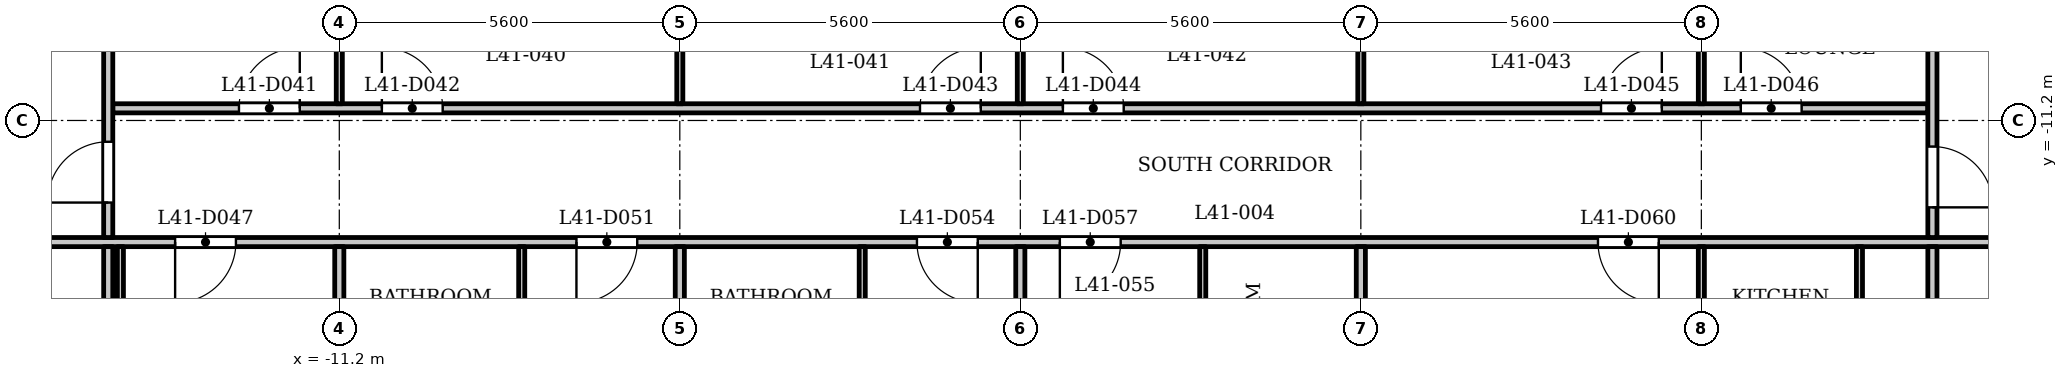
"""IFC4 building model, lengths in metres.
Left out: names, types, materials, properties, quantities, classifications, styles, units other than length and angle.
Written with IfcOpenShell. Run it as: python <this file> out.ifc"""

import sys

from ifc_helpers import new_model, si_unit, direction, frame, frame_2d, origin, place, context, subcontext, project, spatial, rectangle, extrude, element, fill, save


model = new_model("IFC4")
c1 = context("Model", 3, precision=1e-05, world=origin(), true_north=direction((0.0, 1.0)))
c2 = subcontext(c1, "Body", "Model", "MODEL_VIEW")
j1 = project(units=[si_unit("LENGTHUNIT", "METRE"), si_unit("PLANEANGLEUNIT", "RADIAN")], contexts=[c1])
p1 = place(None, origin())
s1 = spatial("IfcSite", under=j1, at=p1, CompositionType="ELEMENT")
p2 = place(p1, origin())
s2 = spatial("IfcBuilding", under=s1, at=p2, CompositionType="ELEMENT")
p3 = place(p2, frame((0.0, 0.0, 160.6)))
s3 = spatial("IfcBuildingStorey", under=s2, at=p3, CompositionType="ELEMENT", Elevation=160.6)
p4 = place(p3, frame((-17.4, -13.2, 0.0), z_axis=(0.0, 0.0, 1.0), x_axis=(1.0, 0.0, 0.0)))
e1 = element("IfcWall", 1, at=p4, inside=s3, PredefinedType="PARTITIONING", context=c2, shape_type="SweptSolid", body=[
    extrude(rectangle(XDim=34.8, YDim=0.15, at=frame_2d((17.4, 0.0))), origin(), (0.0, 0.0, 1.0), 3.2),
])
p5 = place(p4, frame((0.15, 0.0, 0.0)))
e2 = element("IfcOpeningElement", 2, at=p5, cuts=e1, PredefinedType="OPENING", context=c2, shape_type="SweptSolid", body=[
    extrude(rectangle(XDim=1.0, YDim=2.1, at=frame_2d((0.5, 1.05))), frame((0.0, 0.085, 0.0), z_axis=(0.0, -1.0, 0.0), x_axis=(1.0, 0.0, 0.0)), (0.0, 0.0, 1.0), 0.17),
])
p6 = place(p4, frame((33.55, 0.0, 0.0)))
e3 = element("IfcOpeningElement", 3, at=p6, cuts=e1, PredefinedType="OPENING", context=c2, shape_type="SweptSolid", body=[
    extrude(rectangle(XDim=1.0, YDim=2.1, at=frame_2d((0.5, 1.05))), frame((0.0, 0.085, 0.0), z_axis=(0.0, -1.0, 0.0), x_axis=(1.0, 0.0, 0.0)), (0.0, 0.0, 1.0), 0.17),
])
p7 = place(p4, frame((3.5, 0.0, 0.0)))
e4 = element("IfcOpeningElement", 4, at=p7, cuts=e1, PredefinedType="OPENING", context=c2, shape_type="SweptSolid", body=[
    extrude(rectangle(XDim=1.0, YDim=2.1, at=frame_2d((0.5, 1.05))), frame((0.0, 0.085, 0.0), z_axis=(0.0, -1.0, 0.0), x_axis=(1.0, 0.0, 0.0)), (0.0, 0.0, 1.0), 0.17),
])
p8 = place(p4, frame((10.1, 0.0, 0.0)))
e5 = element("IfcOpeningElement", 5, at=p8, cuts=e1, PredefinedType="OPENING", context=c2, shape_type="SweptSolid", body=[
    extrude(rectangle(XDim=1.0, YDim=2.1, at=frame_2d((0.5, 1.05))), frame((0.0, 0.085, 0.0), z_axis=(0.0, -1.0, 0.0), x_axis=(1.0, 0.0, 0.0)), (0.0, 0.0, 1.0), 0.17),
])
p9 = place(p4, frame((15.7, 0.0, 0.0)))
e6 = element("IfcOpeningElement", 6, at=p9, cuts=e1, PredefinedType="OPENING", context=c2, shape_type="SweptSolid", body=[
    extrude(rectangle(XDim=1.0, YDim=2.1, at=frame_2d((0.5, 1.05))), frame((0.0, 0.085, 0.0), z_axis=(0.0, -1.0, 0.0), x_axis=(1.0, 0.0, 0.0)), (0.0, 0.0, 1.0), 0.17),
])
p10 = place(p4, frame((18.05, 0.0, 0.0)))
e7 = element("IfcOpeningElement", 7, at=p10, cuts=e1, PredefinedType="OPENING", context=c2, shape_type="SweptSolid", body=[
    extrude(rectangle(XDim=1.0, YDim=2.1, at=frame_2d((0.5, 1.05))), frame((0.0, 0.085, 0.0), z_axis=(0.0, -1.0, 0.0), x_axis=(1.0, 0.0, 0.0)), (0.0, 0.0, 1.0), 0.17),
])
p11 = place(p4, frame((26.9, 0.0, 0.0)))
e8 = element("IfcOpeningElement", 8, at=p11, cuts=e1, PredefinedType="OPENING", context=c2, shape_type="SweptSolid", body=[
    extrude(rectangle(XDim=1.0, YDim=2.1, at=frame_2d((0.5, 1.05))), frame((0.0, 0.085, 0.0), z_axis=(0.0, -1.0, 0.0), x_axis=(1.0, 0.0, 0.0)), (0.0, 0.0, 1.0), 0.17),
])
p12 = place(p3, frame((-14.925, -11.0, 0.0), z_axis=(0.0, 0.0, 1.0), x_axis=(1.0, 0.0, 0.0)))
e9 = element("IfcWall", 9, at=p12, inside=s3, PredefinedType="PARTITIONING", context=c2, shape_type="SweptSolid", body=[
    extrude(rectangle(XDim=29.85, YDim=0.15, at=frame_2d((14.925, 0.0))), origin(), (0.0, 0.0, 1.0), 3.2),
])
p13 = place(p12, frame((2.075, 0.0, 0.0)))
e10 = element("IfcOpeningElement", 10, at=p13, cuts=e9, PredefinedType="OPENING", context=c2, shape_type="SweptSolid", body=[
    extrude(rectangle(XDim=1.0, YDim=2.1, at=frame_2d((0.5, 1.05))), frame((0.0, 0.085, 0.0), z_axis=(0.0, -1.0, 0.0), x_axis=(1.0, 0.0, 0.0)), (0.0, 0.0, 1.0), 0.17),
])
p14 = place(p12, frame((4.425, 0.0, 0.0)))
e11 = element("IfcOpeningElement", 11, at=p14, cuts=e9, PredefinedType="OPENING", context=c2, shape_type="SweptSolid", body=[
    extrude(rectangle(XDim=1.0, YDim=2.1, at=frame_2d((0.5, 1.05))), frame((0.0, 0.085, 0.0), z_axis=(0.0, -1.0, 0.0), x_axis=(1.0, 0.0, 0.0)), (0.0, 0.0, 1.0), 0.17),
])
p15 = place(p12, frame((13.275, 0.0, 0.0)))
e12 = element("IfcOpeningElement", 12, at=p15, cuts=e9, PredefinedType="OPENING", context=c2, shape_type="SweptSolid", body=[
    extrude(rectangle(XDim=1.0, YDim=2.1, at=frame_2d((0.5, 1.05))), frame((0.0, 0.085, 0.0), z_axis=(0.0, -1.0, 0.0), x_axis=(1.0, 0.0, 0.0)), (0.0, 0.0, 1.0), 0.17),
])
p16 = place(p12, frame((15.625, 0.0, 0.0)))
e13 = element("IfcOpeningElement", 13, at=p16, cuts=e9, PredefinedType="OPENING", context=c2, shape_type="SweptSolid", body=[
    extrude(rectangle(XDim=1.0, YDim=2.1, at=frame_2d((0.5, 1.05))), frame((0.0, 0.085, 0.0), z_axis=(0.0, -1.0, 0.0), x_axis=(1.0, 0.0, 0.0)), (0.0, 0.0, 1.0), 0.17),
])
p17 = place(p12, frame((24.475, 0.0, 0.0)))
e14 = element("IfcOpeningElement", 14, at=p17, cuts=e9, PredefinedType="OPENING", context=c2, shape_type="SweptSolid", body=[
    extrude(rectangle(XDim=1.0, YDim=2.1, at=frame_2d((0.5, 1.05))), frame((0.0, 0.085, 0.0), z_axis=(0.0, -1.0, 0.0), x_axis=(1.0, 0.0, 0.0)), (0.0, 0.0, 1.0), 0.17),
])
p18 = place(p12, frame((26.774, 0.0, 0.0)))
e15 = element("IfcOpeningElement", 15, at=p18, cuts=e9, PredefinedType="OPENING", context=c2, shape_type="SweptSolid", body=[
    extrude(rectangle(XDim=1.0, YDim=2.1, at=frame_2d((0.5, 1.05))), frame((0.0, 0.085, 0.0), z_axis=(0.0, -1.0, 0.0), x_axis=(1.0, 0.0, 0.0)), (0.0, 0.0, 1.0), 0.17),
])
p19 = place(p3, frame((-15.0, -15.325, 0.0), z_axis=(0.0, 0.0, 1.0), x_axis=(0.0, 1.0, 0.0)))
e16 = element("IfcWall", 16, at=p19, inside=s3, PredefinedType="PARTITIONING", context=c2, shape_type="SweptSolid", body=[
    extrude(rectangle(XDim=2.05, YDim=0.15, at=frame_2d((1.025, 0.0))), origin(), (0.0, 0.0, 1.0), 3.2),
])
p20 = place(p3, frame((-15.0, -13.125, 0.0), z_axis=(0.0, 0.0, 1.0), x_axis=(0.0, 1.0, 0.0)))
e17 = element("IfcWall", 17, at=p20, inside=s3, PredefinedType="PARTITIONING", context=c2, shape_type="SweptSolid", body=[
    extrude(rectangle(XDim=6.356, YDim=0.15, at=frame_2d((3.178, 0.0))), origin(), (0.0, 0.0, 1.0), 3.2),
])
p21 = place(p20, frame((0.575, 0.0, 0.0)))
e18 = element("IfcOpeningElement", 18, at=p21, cuts=e17, PredefinedType="OPENING", context=c2, shape_type="SweptSolid", body=[
    extrude(rectangle(XDim=1.0, YDim=2.1, at=frame_2d((0.5, 1.05))), frame((0.0, 0.085, 0.0), z_axis=(0.0, -1.0, 0.0), x_axis=(1.0, 0.0, 0.0)), (0.0, 0.0, 1.0), 0.17),
])
p22 = place(p3, frame((-14.8, -17.05, 0.0), z_axis=(0.0, 0.0, 1.0), x_axis=(0.0, 1.0, 0.0)))
e19 = element("IfcWall", 19, at=p22, inside=s3, PredefinedType="PARTITIONING", context=c2, shape_type="SweptSolid", body=[
    extrude(rectangle(XDim=3.775, YDim=0.1, at=frame_2d((1.888, 0.0))), origin(), (0.0, 0.0, 1.0), 3.2),
])
p23 = place(p3, frame((-11.2, -10.925, 0.0), z_axis=(0.0, 0.0, 1.0), x_axis=(0.0, 1.0, 0.0)))
e20 = element("IfcWall", 20, at=p23, inside=s3, PredefinedType="PARTITIONING", context=c2, shape_type="SweptSolid", body=[
    extrude(rectangle(XDim=3.605, YDim=0.1, at=frame_2d((1.802, 0.0))), origin(), (0.0, 0.0, 1.0), 3.2),
])
p24 = place(p3, frame((-11.2, -17.05, 0.0), z_axis=(0.0, 0.0, 1.0), x_axis=(0.0, 1.0, 0.0)))
e21 = element("IfcWall", 21, at=p24, inside=s3, PredefinedType="PARTITIONING", context=c2, shape_type="SweptSolid", body=[
    extrude(rectangle(XDim=3.775, YDim=0.15, at=frame_2d((1.888, 0.0))), origin(), (0.0, 0.0, 1.0), 3.2),
])
p25 = place(p3, frame((-8.2, -17.05, 0.0), z_axis=(0.0, 0.0, 1.0), x_axis=(0.0, 1.0, 0.0)))
e22 = element("IfcWall", 22, at=p25, inside=s3, PredefinedType="PARTITIONING", context=c2, shape_type="SweptSolid", body=[
    extrude(rectangle(XDim=3.775, YDim=0.1, at=frame_2d((1.888, 0.0))), origin(), (0.0, 0.0, 1.0), 3.2),
])
p26 = place(p3, frame((-5.6, -10.925, 0.0), z_axis=(0.0, 0.0, 1.0), x_axis=(0.0, 1.0, 0.0)))
e23 = element("IfcWall", 23, at=p26, inside=s3, PredefinedType="PARTITIONING", context=c2, shape_type="SweptSolid", body=[
    extrude(rectangle(XDim=3.605, YDim=0.1, at=frame_2d((1.802, 0.0))), origin(), (0.0, 0.0, 1.0), 3.2),
])
p27 = place(p3, frame((-5.6, -17.05, 0.0), z_axis=(0.0, 0.0, 1.0), x_axis=(0.0, 1.0, 0.0)))
e24 = element("IfcWall", 24, at=p27, inside=s3, PredefinedType="PARTITIONING", context=c2, shape_type="SweptSolid", body=[
    extrude(rectangle(XDim=3.775, YDim=0.15, at=frame_2d((1.888, 0.0))), origin(), (0.0, 0.0, 1.0), 3.2),
])
p28 = place(p3, frame((-2.6, -17.05, 0.0), z_axis=(0.0, 0.0, 1.0), x_axis=(0.0, 1.0, 0.0)))
e25 = element("IfcWall", 25, at=p28, inside=s3, PredefinedType="PARTITIONING", context=c2, shape_type="SweptSolid", body=[
    extrude(rectangle(XDim=3.775, YDim=0.1, at=frame_2d((1.888, 0.0))), origin(), (0.0, 0.0, 1.0), 3.2),
])
p29 = place(p3, frame((0.0, -10.925, 0.0), z_axis=(0.0, 0.0, 1.0), x_axis=(0.0, 1.0, 0.0)))
e26 = element("IfcWall", 26, at=p29, inside=s3, PredefinedType="PARTITIONING", context=c2, shape_type="SweptSolid", body=[
    extrude(rectangle(XDim=3.605, YDim=0.1, at=frame_2d((1.802, 0.0))), origin(), (0.0, 0.0, 1.0), 3.2),
])
p30 = place(p3, frame((0.0, -17.05, 0.0), z_axis=(0.0, 0.0, 1.0), x_axis=(0.0, 1.0, 0.0)))
e27 = element("IfcWall", 27, at=p30, inside=s3, PredefinedType="PARTITIONING", context=c2, shape_type="SweptSolid", body=[
    extrude(rectangle(XDim=3.775, YDim=0.15, at=frame_2d((1.888, 0.0))), origin(), (0.0, 0.0, 1.0), 3.2),
])
p31 = place(p3, frame((3.0, -17.05, 0.0), z_axis=(0.0, 0.0, 1.0), x_axis=(0.0, 1.0, 0.0)))
e28 = element("IfcWall", 28, at=p31, inside=s3, PredefinedType="PARTITIONING", context=c2, shape_type="SweptSolid", body=[
    extrude(rectangle(XDim=3.775, YDim=0.1, at=frame_2d((1.888, 0.0))), origin(), (0.0, 0.0, 1.0), 3.2),
])
p32 = place(p3, frame((5.6, -10.925, 0.0), z_axis=(0.0, 0.0, 1.0), x_axis=(0.0, 1.0, 0.0)))
e29 = element("IfcWall", 29, at=p32, inside=s3, PredefinedType="PARTITIONING", context=c2, shape_type="SweptSolid", body=[
    extrude(rectangle(XDim=3.605, YDim=0.1, at=frame_2d((1.802, 0.0))), origin(), (0.0, 0.0, 1.0), 3.2),
])
p33 = place(p3, frame((5.6, -17.05, 0.0), z_axis=(0.0, 0.0, 1.0), x_axis=(0.0, 1.0, 0.0)))
e30 = element("IfcWall", 30, at=p33, inside=s3, PredefinedType="PARTITIONING", context=c2, shape_type="SweptSolid", body=[
    extrude(rectangle(XDim=3.775, YDim=0.15, at=frame_2d((1.888, 0.0))), origin(), (0.0, 0.0, 1.0), 3.2),
])
p34 = place(p3, frame((11.2, -17.05, 0.0), z_axis=(0.0, 0.0, 1.0), x_axis=(0.0, 1.0, 0.0)))
e31 = element("IfcWall", 31, at=p34, inside=s3, PredefinedType="PARTITIONING", context=c2, shape_type="SweptSolid", body=[
    extrude(rectangle(XDim=3.775, YDim=0.1, at=frame_2d((1.888, 0.0))), origin(), (0.0, 0.0, 1.0), 3.2),
])
p35 = place(p34, frame((0.1, 0.0, 0.0)))
e32 = element("IfcOpeningElement", 32, at=p35, cuts=e31, PredefinedType="OPENING", context=c2, shape_type="SweptSolid", body=[
    extrude(rectangle(XDim=0.9, YDim=2.1, at=frame_2d((0.45, 1.05))), frame((0.0, 0.06, 0.0), z_axis=(0.0, -1.0, 0.0), x_axis=(1.0, 0.0, 0.0)), (0.0, 0.0, 1.0), 0.12),
])
p36 = place(p3, frame((11.2, -10.925, 0.0), z_axis=(0.0, 0.0, 1.0), x_axis=(0.0, 1.0, 0.0)))
e33 = element("IfcWall", 33, at=p36, inside=s3, PredefinedType="PARTITIONING", context=c2, shape_type="SweptSolid", body=[
    extrude(rectangle(XDim=3.605, YDim=0.1, at=frame_2d((1.802, 0.0))), origin(), (0.0, 0.0, 1.0), 3.2),
])
p37 = place(p3, frame((13.8, -17.05, 0.0), z_axis=(0.0, 0.0, 1.0), x_axis=(0.0, 1.0, 0.0)))
e34 = element("IfcWall", 34, at=p37, inside=s3, PredefinedType="PARTITIONING", context=c2, shape_type="SweptSolid", body=[
    extrude(rectangle(XDim=3.775, YDim=0.1, at=frame_2d((1.888, 0.0))), origin(), (0.0, 0.0, 1.0), 3.2),
])
p38 = place(p3, frame((15.0, -15.325, 0.0), z_axis=(0.0, 0.0, 1.0), x_axis=(0.0, 1.0, 0.0)))
e35 = element("IfcWall", 35, at=p38, inside=s3, PredefinedType="PARTITIONING", context=c2, shape_type="SweptSolid", body=[
    extrude(rectangle(XDim=2.05, YDim=0.15, at=frame_2d((1.025, 0.0))), origin(), (0.0, 0.0, 1.0), 3.2),
])
p39 = place(p3, frame((15.0, -13.125, 0.0), z_axis=(0.0, 0.0, 1.0), x_axis=(0.0, 1.0, 0.0)))
e36 = element("IfcWall", 36, at=p39, inside=s3, PredefinedType="PARTITIONING", context=c2, shape_type="SweptSolid", body=[
    extrude(rectangle(XDim=6.356, YDim=0.15, at=frame_2d((3.178, 0.0))), origin(), (0.0, 0.0, 1.0), 3.2),
])
p40 = place(p39, frame((0.496, 0.0, 0.0)))
e37 = element("IfcOpeningElement", 37, at=p40, cuts=e36, PredefinedType="OPENING", context=c2, shape_type="SweptSolid", body=[
    extrude(rectangle(XDim=1.0, YDim=2.1, at=frame_2d((0.5, 1.05))), frame((0.0, 0.085, 0.0), z_axis=(0.0, -1.0, 0.0), x_axis=(1.0, 0.0, 0.0)), (0.0, 0.0, 1.0), 0.17),
])
p41 = place(p21, origin())
e38 = element("IfcDoor", 38, at=p41, inside=s3, OperationType="SINGLE_SWING_RIGHT", PredefinedType="DOOR", context=c2, shape_type="SweptSolid", body=[
    extrude(rectangle(XDim=1.0, YDim=2.1, at=frame_2d((0.5, 1.05))), frame((0.0, 0.025, 0.0), z_axis=(0.0, -1.0, 0.0), x_axis=(1.0, 0.0, 0.0)), (0.0, 0.0, 1.0), 0.05),
])
fill(e18, e38)
p42 = place(p40, origin())
e39 = element("IfcDoor", 39, at=p42, inside=s3, OperationType="SINGLE_SWING_LEFT", PredefinedType="DOOR", context=c2, shape_type="SweptSolid", body=[
    extrude(rectangle(XDim=1.0, YDim=2.1, at=frame_2d((0.5, 1.05))), frame((0.0, 0.025, 0.0), z_axis=(0.0, -1.0, 0.0), x_axis=(1.0, 0.0, 0.0)), (0.0, 0.0, 1.0), 0.05),
])
fill(e37, e39)
p43 = place(p13, origin())
e40 = element("IfcDoor", 40, at=p43, inside=s3, OperationType="SINGLE_SWING_LEFT", PredefinedType="DOOR", context=c2, shape_type="SweptSolid", body=[
    extrude(rectangle(XDim=1.0, YDim=2.1, at=frame_2d((0.5, 1.05))), frame((0.0, 0.025, 0.0), z_axis=(0.0, -1.0, 0.0), x_axis=(1.0, 0.0, 0.0)), (0.0, 0.0, 1.0), 0.05),
])
fill(e10, e40)
p44 = place(p14, origin())
e41 = element("IfcDoor", 41, at=p44, inside=s3, OperationType="SINGLE_SWING_RIGHT", PredefinedType="DOOR", context=c2, shape_type="SweptSolid", body=[
    extrude(rectangle(XDim=1.0, YDim=2.1, at=frame_2d((0.5, 1.05))), frame((0.0, 0.025, 0.0), z_axis=(0.0, -1.0, 0.0), x_axis=(1.0, 0.0, 0.0)), (0.0, 0.0, 1.0), 0.05),
])
fill(e11, e41)
p45 = place(p15, origin())
e42 = element("IfcDoor", 42, at=p45, inside=s3, OperationType="SINGLE_SWING_LEFT", PredefinedType="DOOR", context=c2, shape_type="SweptSolid", body=[
    extrude(rectangle(XDim=1.0, YDim=2.1, at=frame_2d((0.5, 1.05))), frame((0.0, 0.025, 0.0), z_axis=(0.0, -1.0, 0.0), x_axis=(1.0, 0.0, 0.0)), (0.0, 0.0, 1.0), 0.05),
])
fill(e12, e42)
p46 = place(p16, origin())
e43 = element("IfcDoor", 43, at=p46, inside=s3, OperationType="SINGLE_SWING_RIGHT", PredefinedType="DOOR", context=c2, shape_type="SweptSolid", body=[
    extrude(rectangle(XDim=1.0, YDim=2.1, at=frame_2d((0.5, 1.05))), frame((0.0, 0.025, 0.0), z_axis=(0.0, -1.0, 0.0), x_axis=(1.0, 0.0, 0.0)), (0.0, 0.0, 1.0), 0.05),
])
fill(e13, e43)
p47 = place(p17, origin())
e44 = element("IfcDoor", 44, at=p47, inside=s3, OperationType="SINGLE_SWING_LEFT", PredefinedType="DOOR", context=c2, shape_type="SweptSolid", body=[
    extrude(rectangle(XDim=1.0, YDim=2.1, at=frame_2d((0.5, 1.05))), frame((0.0, 0.025, 0.0), z_axis=(0.0, -1.0, 0.0), x_axis=(1.0, 0.0, 0.0)), (0.0, 0.0, 1.0), 0.05),
])
fill(e14, e44)
p48 = place(p18, origin())
e45 = element("IfcDoor", 45, at=p48, inside=s3, OperationType="SINGLE_SWING_RIGHT", PredefinedType="DOOR", context=c2, shape_type="SweptSolid", body=[
    extrude(rectangle(XDim=1.0, YDim=2.1, at=frame_2d((0.5, 1.05))), frame((0.0, 0.025, 0.0), z_axis=(0.0, -1.0, 0.0), x_axis=(1.0, 0.0, 0.0)), (0.0, 0.0, 1.0), 0.05),
])
fill(e15, e45)
p49 = place(p7, origin())
e46 = element("IfcDoor", 46, at=p49, inside=s3, OperationType="SINGLE_SWING_LEFT", PredefinedType="DOOR", context=c2, shape_type="SweptSolid", body=[
    extrude(rectangle(XDim=1.0, YDim=2.1, at=frame_2d((0.5, 1.05))), frame((0.0, 0.025, 0.0), z_axis=(0.0, -1.0, 0.0), x_axis=(1.0, 0.0, 0.0)), (0.0, 0.0, 1.0), 0.05),
])
fill(e4, e46)
p50 = place(p8, origin())
e47 = element("IfcDoor", 47, at=p50, inside=s3, OperationType="SINGLE_SWING_LEFT", PredefinedType="DOOR", context=c2, shape_type="SweptSolid", body=[
    extrude(rectangle(XDim=1.0, YDim=2.1, at=frame_2d((0.5, 1.05))), frame((0.0, 0.025, 0.0), z_axis=(0.0, -1.0, 0.0), x_axis=(1.0, 0.0, 0.0)), (0.0, 0.0, 1.0), 0.05),
])
fill(e5, e47)
p51 = place(p9, origin())
e48 = element("IfcDoor", 48, at=p51, inside=s3, OperationType="SINGLE_SWING_RIGHT", PredefinedType="DOOR", context=c2, shape_type="SweptSolid", body=[
    extrude(rectangle(XDim=1.0, YDim=2.1, at=frame_2d((0.5, 1.05))), frame((0.0, 0.025, 0.0), z_axis=(0.0, -1.0, 0.0), x_axis=(1.0, 0.0, 0.0)), (0.0, 0.0, 1.0), 0.05),
])
fill(e6, e48)
p52 = place(p10, origin())
e49 = element("IfcDoor", 49, at=p52, inside=s3, OperationType="SINGLE_SWING_LEFT", PredefinedType="DOOR", context=c2, shape_type="SweptSolid", body=[
    extrude(rectangle(XDim=1.0, YDim=2.1, at=frame_2d((0.5, 1.05))), frame((0.0, 0.025, 0.0), z_axis=(0.0, -1.0, 0.0), x_axis=(1.0, 0.0, 0.0)), (0.0, 0.0, 1.0), 0.05),
])
fill(e7, e49)
p53 = place(p11, origin())
e50 = element("IfcDoor", 50, at=p53, inside=s3, OperationType="SINGLE_SWING_RIGHT", PredefinedType="DOOR", context=c2, shape_type="SweptSolid", body=[
    extrude(rectangle(XDim=1.0, YDim=2.1, at=frame_2d((0.5, 1.05))), frame((0.0, 0.025, 0.0), z_axis=(0.0, -1.0, 0.0), x_axis=(1.0, 0.0, 0.0)), (0.0, 0.0, 1.0), 0.05),
])
fill(e8, e50)
save(model, sys.argv[1])
